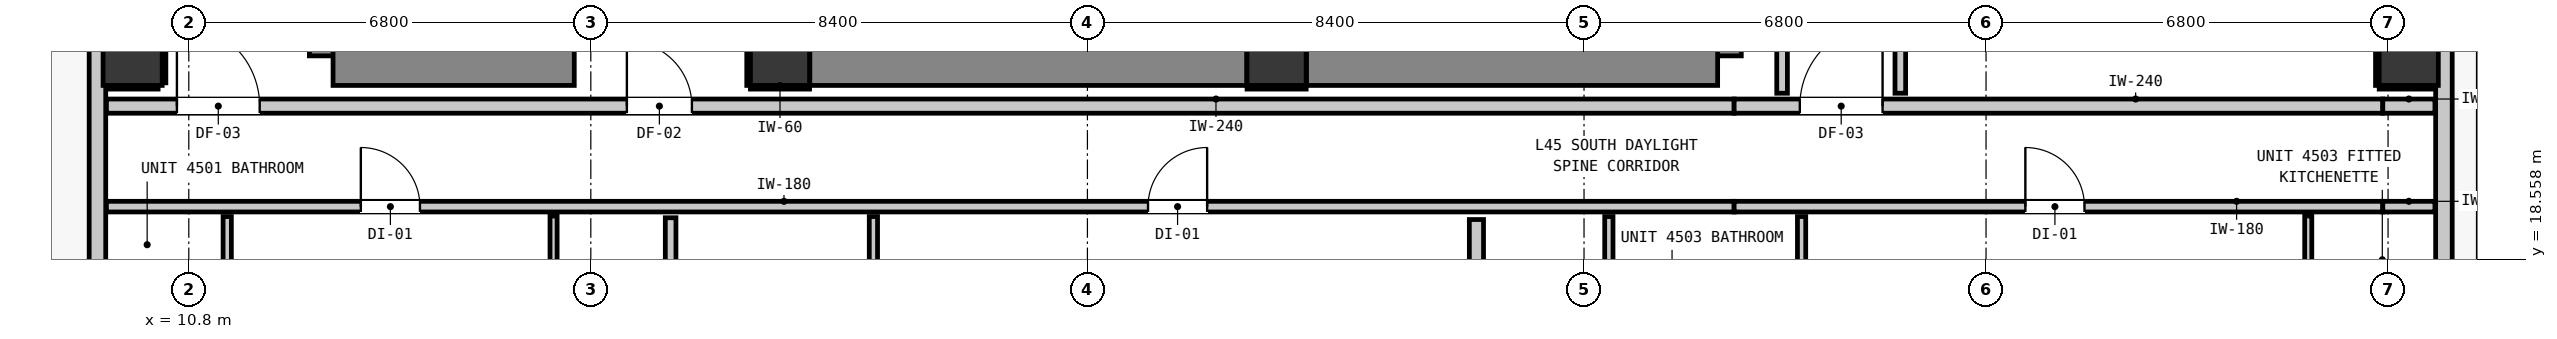
"""IFC4 building model, lengths in metres.
Left out: names, types, materials, properties, quantities, classifications, styles, units other than length and angle.
Written with IfcOpenShell. Run it as: python <this file> out.ifc"""

import sys

from ifc_helpers import new_model, si_unit, direction, frame, frame_2d, origin, origin_2d, place, context, subcontext, project, spatial, rectangle, extrude, element, fill, save


model = new_model("IFC4")
c1 = context("Model", 3, precision=1e-05, world=origin(), true_north=direction((0.0, 1.0)))
c2 = subcontext(c1, "Body", "Model", "MODEL_VIEW")
j1 = project(units=[si_unit("LENGTHUNIT", "METRE"), si_unit("PLANEANGLEUNIT", "RADIAN")], contexts=[c1])
p1 = place(None, origin())
s1 = spatial("IfcSite", under=j1, at=p1, CompositionType="ELEMENT")
p2 = place(p1, origin())
s2 = spatial("IfcBuilding", under=s1, at=p2, CompositionType="ELEMENT")
p3 = place(p2, frame((0.0, 0.0, 155.88)))
s3 = spatial("IfcBuildingStorey", under=s2, at=p3, CompositionType="ELEMENT", Elevation=155.88)
for number, where, z_axis, x_axis in (
    (1, (20.8, 22.0, 0.0), (0.0, 0.0, 1.0), (1.0, 0.0, 0.0)),
    (2, (29.2, 22.0, 0.0), (0.0, 0.0, 1.0), (1.0, 0.0, 0.0)),
):
    element("IfcColumn", number, at=place(p3, frame(where, z_axis=z_axis, x_axis=x_axis)), inside=s3, PredefinedType="COLUMN", context=c2, shape_type="SweptSolid", body=[
        extrude(rectangle(XDim=1.0, YDim=1.0, at=origin_2d()), origin(), (0.0, 0.0, 1.0), 3.32),
    ])
p4 = place(p3, frame((13.34, 22.0, 0.0), z_axis=(0.0, 0.0, 1.0), x_axis=(0.0, 1.0, 0.0)))
e3 = element("IfcWall", 3, at=p4, inside=s3, PredefinedType="SHEAR", context=c2, shape_type="SweptSolid", body=[
    extrude(rectangle(XDim=8.195, YDim=1.0, at=frame_2d((4.098, 0.0))), origin(), (0.0, 0.0, 1.0), 3.32),
])
p5 = place(p3, frame((13.24, 22.0, 0.0), z_axis=(0.0, 0.0, 1.0), x_axis=(1.0, 0.0, 0.0)))
e4 = element("IfcWall", 4, at=p5, inside=s3, PredefinedType="SHEAR", context=c2, shape_type="SweptSolid", body=[
    extrude(rectangle(XDim=4.08, YDim=1.0, at=frame_2d((2.04, 0.0))), origin(), (0.0, 0.0, 1.0), 3.32),
])
p6 = place(p3, frame((36.56, 22.0, 0.0), z_axis=(0.0, 0.0, 1.0), x_axis=(0.0, 1.0, 0.0)))
e5 = element("IfcWall", 5, at=p6, inside=s3, PredefinedType="SHEAR", context=c2, shape_type="SweptSolid", body=[
    extrude(rectangle(XDim=8.195, YDim=1.0, at=frame_2d((4.098, 0.0))), origin(), (0.0, 0.0, 1.0), 3.32),
])
p7 = place(p3, frame((29.705, 22.0, 0.0), z_axis=(0.0, 0.0, 1.0), x_axis=(1.0, 0.0, 0.0)))
e6 = element("IfcWall", 6, at=p7, inside=s3, PredefinedType="SHEAR", context=c2, shape_type="SweptSolid", body=[
    extrude(rectangle(XDim=6.955, YDim=1.0, at=frame_2d((3.478, 0.0))), origin(), (0.0, 0.0, 1.0), 3.32),
])
p8 = place(p3, frame((21.305, 22.0, 0.0), z_axis=(0.0, 0.0, 1.0), x_axis=(1.0, 0.0, 0.0)))
e7 = element("IfcWall", 7, at=p8, inside=s3, PredefinedType="SHEAR", context=c2, shape_type="SweptSolid", body=[
    extrude(rectangle(XDim=7.39, YDim=1.0, at=frame_2d((3.695, 0.0))), origin(), (0.0, 0.0, 1.0), 3.32),
])
for number, where, z_axis, x_axis in (
    (8, (9.85, 22.0, 0.0), (0.0, 0.0, 1.0), (1.0, 0.0, 0.0)),
    (9, (48.35, 22.0, 0.0), (0.0, 0.0, 1.0), (1.0, 0.0, 0.0)),
):
    element("IfcColumn", number, at=place(p3, frame(where, z_axis=z_axis, x_axis=x_axis)), inside=s3, PredefinedType="COLUMN", context=c2, shape_type="SweptSolid", body=[
        extrude(rectangle(XDim=1.0, YDim=1.0, at=origin_2d()), origin(), (0.0, 0.0, 1.0), 3.32),
    ])
p9 = place(p3, frame((9.255, 17.555, 0.0), z_axis=(0.0, 0.0, 1.0), x_axis=(0.0, 1.0, 0.0)))
e10 = element("IfcWall", 10, at=p9, inside=s3, PredefinedType="STANDARD", context=c2, shape_type="SweptSolid", body=[
    extrude(rectangle(XDim=32.29, YDim=0.28, at=frame_2d((16.145, 0.0))), origin(), (0.0, 0.0, 1.0), 3.08),
])
p10 = place(p9, frame((5.467, 0.0, 0.0)))
e11 = element("IfcOpeningElement", 11, at=p10, cuts=e10, PredefinedType="OPENING", context=c2, shape_type="SweptSolid", body=[
    extrude(rectangle(XDim=1.0, YDim=2.15, at=frame_2d((0.5, 1.075))), frame((0.0, 0.15, 0.0), z_axis=(0.0, -1.0, 0.0), x_axis=(1.0, 0.0, 0.0)), (0.0, 0.0, 1.0), 0.3),
])
p11 = place(p9, frame((30.727, 0.0, 0.85)))
e12 = element("IfcOpeningElement", 12, at=p11, cuts=e10, PredefinedType="OPENING", context=c2, shape_type="SweptSolid", body=[
    extrude(rectangle(XDim=1.1, YDim=2.05, at=frame_2d((0.55, 1.025))), frame((0.0, 0.15, 0.0), z_axis=(0.0, -1.0, 0.0), x_axis=(1.0, 0.0, 0.0)), (0.0, 0.0, 1.0), 0.3),
])
p12 = place(p3, frame((48.945, 49.845, 0.0), z_axis=(0.0, 0.0, 1.0), x_axis=(0.0, -1.0, 0.0)))
e13 = element("IfcWall", 13, at=p12, inside=s3, PredefinedType="STANDARD", context=c2, shape_type="SweptSolid", body=[
    extrude(rectangle(XDim=32.29, YDim=0.28, at=frame_2d((16.145, 0.0))), origin(), (0.0, 0.0, 1.0), 3.08),
])
p13 = place(p12, frame((0.904, 0.0, 0.0)))
e14 = element("IfcOpeningElement", 14, at=p13, cuts=e13, PredefinedType="OPENING", context=c2, shape_type="SweptSolid", body=[
    extrude(rectangle(XDim=1.0, YDim=2.15, at=frame_2d((0.5, 1.075))), frame((0.0, 0.15, 0.0), z_axis=(0.0, -1.0, 0.0), x_axis=(1.0, 0.0, 0.0)), (0.0, 0.0, 1.0), 0.3),
])
p14 = place(p12, frame((3.049, 0.0, 0.85)))
e15 = element("IfcOpeningElement", 15, at=p14, cuts=e13, PredefinedType="OPENING", context=c2, shape_type="SweptSolid", body=[
    extrude(rectangle(XDim=1.1, YDim=2.05, at=frame_2d((0.55, 1.025))), frame((0.0, 0.15, 0.0), z_axis=(0.0, -1.0, 0.0), x_axis=(1.0, 0.0, 0.0)), (0.0, 0.0, 1.0), 0.3),
])
p15 = place(p12, frame((21.311, 0.0, 0.85)))
e16 = element("IfcOpeningElement", 16, at=p15, cuts=e13, PredefinedType="OPENING", context=c2, shape_type="SweptSolid", body=[
    extrude(rectangle(XDim=1.1, YDim=2.05, at=frame_2d((0.55, 1.025))), frame((0.0, 0.15, 0.0), z_axis=(0.0, -1.0, 0.0), x_axis=(1.0, 0.0, 0.0)), (0.0, 0.0, 1.0), 0.3),
])
p16 = place(p12, frame((12.32, 0.0, 0.85)))
e17 = element("IfcOpeningElement", 17, at=p16, cuts=e13, PredefinedType="OPENING", context=c2, shape_type="SweptSolid", body=[
    extrude(rectangle(XDim=1.1, YDim=2.05, at=frame_2d((0.55, 1.025))), frame((0.0, 0.15, 0.0), z_axis=(0.0, -1.0, 0.0), x_axis=(1.0, 0.0, 0.0)), (0.0, 0.0, 1.0), 0.3),
])
p17 = place(p3, frame((9.407, 21.15, 0.0), z_axis=(0.0, 0.0, 1.0), x_axis=(1.0, 0.0, 0.0)))
e18 = element("IfcWall", 18, at=p17, inside=s3, PredefinedType="PARTITIONING", context=c2, shape_type="SweptSolid", body=[
    extrude(rectangle(XDim=27.532, YDim=0.24, at=frame_2d((13.766, 0.0))), origin(), (0.0, 0.0, 1.0), 3.08),
])
p18 = place(p17, frame((8.803, 0.0, 0.0)))
e19 = element("IfcOpeningElement", 19, at=p18, cuts=e18, PredefinedType="OPENING", context=c2, shape_type="SweptSolid", body=[
    extrude(rectangle(XDim=1.1, YDim=2.15, at=frame_2d((0.55, 1.075))), frame((0.0, 0.13, 0.0), z_axis=(0.0, -1.0, 0.0), x_axis=(1.0, 0.0, 0.0)), (0.0, 0.0, 1.0), 0.26),
])
p19 = place(p17, frame((1.192, 0.0, 0.0)))
e20 = element("IfcOpeningElement", 20, at=p19, cuts=e18, PredefinedType="OPENING", context=c2, shape_type="SweptSolid", body=[
    extrude(rectangle(XDim=1.4, YDim=2.15, at=frame_2d((0.7, 1.075))), frame((0.0, 0.13, 0.0), z_axis=(0.0, -1.0, 0.0), x_axis=(1.0, 0.0, 0.0)), (0.0, 0.0, 1.0), 0.26),
])
p20 = place(p3, frame((36.939, 21.15, 0.0), z_axis=(0.0, 0.0, 1.0), x_axis=(1.0, 0.0, 0.0)))
e21 = element("IfcWall", 21, at=p20, inside=s3, PredefinedType="PARTITIONING", context=c2, shape_type="SweptSolid", body=[
    extrude(rectangle(XDim=10.972, YDim=0.24, at=frame_2d((5.486, 0.0))), origin(), (0.0, 0.0, 1.0), 2.565),
])
p21 = place(p20, frame((1.111, 0.0, 0.0)))
e22 = element("IfcOpeningElement", 22, at=p21, cuts=e21, PredefinedType="OPENING", context=c2, shape_type="SweptSolid", body=[
    extrude(rectangle(XDim=1.4, YDim=2.15, at=frame_2d((0.7, 1.075))), frame((0.0, 0.13, 0.0), z_axis=(0.0, -1.0, 0.0), x_axis=(1.0, 0.0, 0.0)), (0.0, 0.0, 1.0), 0.26),
])
p22 = place(p3, frame((47.911, 21.15, 0.0), z_axis=(0.0, 0.0, 1.0), x_axis=(1.0, 0.0, 0.0)))
e23 = element("IfcWall", 23, at=p22, inside=s3, PredefinedType="PARTITIONING", context=c2, shape_type="SweptSolid", body=[
    extrude(rectangle(XDim=0.882, YDim=0.24, at=frame_2d((0.441, 0.0))), origin(), (0.0, 0.0, 1.0), 3.08),
])
p23 = place(p3, frame((9.407, 19.45, 0.0), z_axis=(0.0, 0.0, 1.0), x_axis=(1.0, 0.0, 0.0)))
e24 = element("IfcWall", 24, at=p23, inside=s3, PredefinedType="PARTITIONING", context=c2, shape_type="SweptSolid", body=[
    extrude(rectangle(XDim=27.532, YDim=0.18, at=frame_2d((13.766, 0.0))), origin(), (0.0, 0.0, 1.0), 3.08),
])
p24 = place(p23, frame((4.303, 0.0, 0.0)))
e25 = element("IfcOpeningElement", 25, at=p24, cuts=e24, PredefinedType="OPENING", context=c2, shape_type="SweptSolid", body=[
    extrude(rectangle(XDim=1.0, YDim=2.15, at=frame_2d((0.5, 1.075))), frame((0.0, 0.1, 0.0), z_axis=(0.0, -1.0, 0.0), x_axis=(1.0, 0.0, 0.0)), (0.0, 0.0, 1.0), 0.2),
])
p25 = place(p23, frame((17.618, 0.0, 0.0)))
e26 = element("IfcOpeningElement", 26, at=p25, cuts=e24, PredefinedType="OPENING", context=c2, shape_type="SweptSolid", body=[
    extrude(rectangle(XDim=1.0, YDim=2.15, at=frame_2d((0.5, 1.075))), frame((0.0, 0.1, 0.0), z_axis=(0.0, -1.0, 0.0), x_axis=(1.0, 0.0, 0.0)), (0.0, 0.0, 1.0), 0.2),
])
p26 = place(p3, frame((36.939, 19.45, 0.0), z_axis=(0.0, 0.0, 1.0), x_axis=(1.0, 0.0, 0.0)))
e27 = element("IfcWall", 27, at=p26, inside=s3, PredefinedType="PARTITIONING", context=c2, shape_type="SweptSolid", body=[
    extrude(rectangle(XDim=10.972, YDim=0.18, at=frame_2d((5.486, 0.0))), origin(), (0.0, 0.0, 1.0), 2.565),
])
p27 = place(p26, frame((4.926, 0.0, 0.0)))
e28 = element("IfcOpeningElement", 28, at=p27, cuts=e27, PredefinedType="OPENING", context=c2, shape_type="SweptSolid", body=[
    extrude(rectangle(XDim=1.0, YDim=2.15, at=frame_2d((0.5, 1.075))), frame((0.0, 0.1, 0.0), z_axis=(0.0, -1.0, 0.0), x_axis=(1.0, 0.0, 0.0)), (0.0, 0.0, 1.0), 0.2),
])
p28 = place(p3, frame((47.911, 19.45, 0.0), z_axis=(0.0, 0.0, 1.0), x_axis=(1.0, 0.0, 0.0)))
e29 = element("IfcWall", 29, at=p28, inside=s3, PredefinedType="PARTITIONING", context=c2, shape_type="SweptSolid", body=[
    extrude(rectangle(XDim=0.882, YDim=0.18, at=frame_2d((0.441, 0.0))), origin(), (0.0, 0.0, 1.0), 3.08),
])
p29 = place(p3, frame((32.58, 15.407, 0.0), z_axis=(0.0, 0.0, 1.0), x_axis=(0.0, 1.0, 0.0)))
e30 = element("IfcWall", 30, at=p29, inside=s3, PredefinedType="PARTITIONING", context=c2, shape_type="SweptSolid", body=[
    extrude(rectangle(XDim=3.825, YDim=0.24, at=frame_2d((1.913, 0.0))), origin(), (0.0, 0.0, 1.0), 3.08),
])
p30 = place(p29, frame((1.568, 0.0, 0.0)))
e31 = element("IfcOpeningElement", 31, at=p30, cuts=e30, PredefinedType="OPENING", context=c2, shape_type="SweptSolid", body=[
    extrude(rectangle(XDim=0.9, YDim=2.1, at=frame_2d((0.45, 1.05))), frame((0.0, 0.13, 0.0), z_axis=(0.0, -1.0, 0.0), x_axis=(1.0, 0.0, 0.0)), (0.0, 0.0, 1.0), 0.26),
])
p31 = place(p3, frame((18.95, 15.407, 0.0), z_axis=(0.0, 0.0, 1.0), x_axis=(0.0, 1.0, 0.0)))
e32 = element("IfcWall", 32, at=p31, inside=s3, PredefinedType="PARTITIONING", context=c2, shape_type="SweptSolid", body=[
    extrude(rectangle(XDim=3.855, YDim=0.18, at=frame_2d((1.927, 0.0))), origin(), (0.0, 0.0, 1.0), 3.08),
])
p32 = place(p3, frame((37.75, 21.368, 0.0), z_axis=(0.0, 0.0, 1.0), x_axis=(0.0, 1.0, 0.0)))
e33 = element("IfcWall", 33, at=p32, inside=s3, PredefinedType="PARTITIONING", context=c2, shape_type="SweptSolid", body=[
    extrude(rectangle(XDim=18.694, YDim=0.18, at=frame_2d((9.347, 0.0))), origin(), (0.0, 0.0, 1.0), 3.08),
])
p33 = place(p3, frame((39.75, 21.368, 0.0), z_axis=(0.0, 0.0, 1.0), x_axis=(0.0, 1.0, 0.0)))
e34 = element("IfcWall", 34, at=p33, inside=s3, PredefinedType="PARTITIONING", context=c2, shape_type="SweptSolid", body=[
    extrude(rectangle(XDim=3.964, YDim=0.18, at=frame_2d((1.982, 0.0))), origin(), (0.0, 0.0, 1.0), 3.08),
])
p34 = place(p3, frame((11.45, 16.278, 0.0), z_axis=(0.0, 0.0, 1.0), x_axis=(0.0, 1.0, 0.0)))
e35 = element("IfcWall", 35, at=p34, inside=s3, PredefinedType="PARTITIONING", context=c2, shape_type="SweptSolid", body=[
    extrude(rectangle(XDim=3.004, YDim=0.14, at=frame_2d((1.502, 0.0))), origin(), (0.0, 0.0, 1.0), 2.565),
])
p35 = place(p34, frame((0.717, 0.0, 0.0)))
e36 = element("IfcOpeningElement", 36, at=p35, cuts=e35, PredefinedType="OPENING", context=c2, shape_type="SweptSolid", body=[
    extrude(rectangle(XDim=0.86, YDim=2.02, at=frame_2d((0.43, 1.01))), frame((0.0, 0.08, 0.0), z_axis=(0.0, -1.0, 0.0), x_axis=(1.0, 0.0, 0.0)), (0.0, 0.0, 1.0), 0.16),
])
p36 = place(p3, frame((22.38, 15.407, 0.0), z_axis=(0.0, 0.0, 1.0), x_axis=(0.0, 1.0, 0.0)))
e37 = element("IfcWall", 37, at=p36, inside=s3, PredefinedType="PARTITIONING", context=c2, shape_type="SweptSolid", body=[
    extrude(rectangle(XDim=3.875, YDim=0.14, at=frame_2d((1.938, 0.0))), origin(), (0.0, 0.0, 1.0), 3.08),
])
p37 = place(p36, frame((1.588, 0.0, 0.0)))
e38 = element("IfcOpeningElement", 38, at=p37, cuts=e37, PredefinedType="OPENING", context=c2, shape_type="SweptSolid", body=[
    extrude(rectangle(XDim=0.86, YDim=2.02, at=frame_2d((0.43, 1.01))), frame((0.0, 0.08, 0.0), z_axis=(0.0, -1.0, 0.0), x_axis=(1.0, 0.0, 0.0)), (0.0, 0.0, 1.0), 0.16),
])
p38 = place(p3, frame((34.82, 15.407, 0.0), z_axis=(0.0, 0.0, 1.0), x_axis=(0.0, 1.0, 0.0)))
e39 = element("IfcWall", 39, at=p38, inside=s3, PredefinedType="PARTITIONING", context=c2, shape_type="SweptSolid", body=[
    extrude(rectangle(XDim=3.875, YDim=0.14, at=frame_2d((1.938, 0.0))), origin(), (0.0, 0.0, 1.0), 3.08),
])
p39 = place(p3, frame((38.08, 15.407, 0.0), z_axis=(0.0, 0.0, 1.0), x_axis=(0.0, 1.0, 0.0)))
e40 = element("IfcWall", 40, at=p39, inside=s3, PredefinedType="PARTITIONING", context=c2, shape_type="SweptSolid", body=[
    extrude(rectangle(XDim=3.875, YDim=0.14, at=frame_2d((1.938, 0.0))), origin(), (0.0, 0.0, 1.0), 3.08),
])
p40 = place(p39, frame((1.588, 0.0, 0.0)))
e41 = element("IfcOpeningElement", 41, at=p40, cuts=e40, PredefinedType="OPENING", context=c2, shape_type="SweptSolid", body=[
    extrude(rectangle(XDim=0.86, YDim=2.02, at=frame_2d((0.43, 1.01))), frame((0.0, 0.08, 0.0), z_axis=(0.0, -1.0, 0.0), x_axis=(1.0, 0.0, 0.0)), (0.0, 0.0, 1.0), 0.16),
])
p41 = place(p3, frame((16.97, 15.407, 0.0), z_axis=(0.0, 0.0, 1.0), x_axis=(0.0, 1.0, 0.0)))
e42 = element("IfcWall", 42, at=p41, inside=s3, PredefinedType="PARTITIONING", context=c2, shape_type="SweptSolid", body=[
    extrude(rectangle(XDim=3.885, YDim=0.12, at=frame_2d((1.942, 0.0))), origin(), (0.0, 0.0, 1.0), 3.08),
])
p42 = place(p41, frame((1.568, 0.0, 0.0)))
e43 = element("IfcOpeningElement", 43, at=p42, cuts=e42, PredefinedType="OPENING", context=c2, shape_type="SweptSolid", body=[
    extrude(rectangle(XDim=0.9, YDim=2.1, at=frame_2d((0.45, 1.05))), frame((0.0, 0.07, 0.0), z_axis=(0.0, -1.0, 0.0), x_axis=(1.0, 0.0, 0.0)), (0.0, 0.0, 1.0), 0.14),
])
p43 = place(p3, frame((46.65, 15.475, 0.0), z_axis=(0.0, 0.0, 1.0), x_axis=(0.0, 1.0, 0.0)))
e44 = element("IfcWall", 44, at=p43, inside=s3, PredefinedType="PARTITIONING", context=c2, shape_type="SweptSolid", body=[
    extrude(rectangle(XDim=3.817, YDim=0.12, at=frame_2d((1.908, 0.0))), origin(), (0.0, 0.0, 1.0), 3.08),
])
p44 = place(p43, frame((1.5, 0.0, 0.0)))
e45 = element("IfcOpeningElement", 45, at=p44, cuts=e44, PredefinedType="OPENING", context=c2, shape_type="SweptSolid", body=[
    extrude(rectangle(XDim=0.9, YDim=2.1, at=frame_2d((0.45, 1.05))), frame((0.0, 0.07, 0.0), z_axis=(0.0, -1.0, 0.0), x_axis=(1.0, 0.0, 0.0)), (0.0, 0.0, 1.0), 0.14),
])
for number, where, z_axis, x_axis in (
    (46, (20.3, 21.468, 0.0), (0.0, 0.0, 1.0), (1.0, 0.0, 0.0)),
    (47, (20.268, 21.5, 0.0), (0.0, 0.0, 1.0), (0.0, 1.0, 0.0)),
    (48, (28.7, 21.468, 0.0), (0.0, 0.0, 1.0), (1.0, 0.0, 0.0)),
):
    element("IfcWall", number, at=place(p3, frame(where, z_axis=z_axis, x_axis=x_axis)), inside=s3, PredefinedType="PARTITIONING", context=c2, shape_type="SweptSolid", body=[
        extrude(rectangle(XDim=1.0, YDim=0.06, at=frame_2d((0.5, 0.0))), origin(), (0.0, 0.0, 1.0), 1.45),
    ])
p45 = place(p3, frame((9.41, 21.468, 0.0), z_axis=(0.0, 0.0, 1.0), x_axis=(1.0, 0.0, 0.0)))
e49 = element("IfcWall", 49, at=p45, inside=s3, PredefinedType="PARTITIONING", context=c2, shape_type="SweptSolid", body=[
    extrude(rectangle(XDim=0.871, YDim=0.06, at=frame_2d((0.436, 0.0))), origin(), (0.0, 0.0, 1.0), 1.45),
])
p46 = place(p3, frame((10.382, 21.544, 0.0), z_axis=(0.0, 0.0, 1.0), x_axis=(0.0, 1.0, 0.0)))
e50 = element("IfcWall", 50, at=p46, inside=s3, PredefinedType="PARTITIONING", context=c2, shape_type="SweptSolid", body=[
    extrude(rectangle(XDim=0.956, YDim=0.06, at=frame_2d((0.478, 0.0))), origin(), (0.0, 0.0, 1.0), 1.45),
])
p47 = place(p3, frame((47.85, 21.468, 0.0), z_axis=(0.0, 0.0, 1.0), x_axis=(1.0, 0.0, 0.0)))
e51 = element("IfcWall", 51, at=p47, inside=s3, PredefinedType="PARTITIONING", context=c2, shape_type="SweptSolid", body=[
    extrude(rectangle(XDim=0.94, YDim=0.06, at=frame_2d((0.47, 0.0))), origin(), (0.0, 0.0, 1.0), 1.45),
])
p48 = place(p3, frame((47.818, 21.5, 0.0), z_axis=(0.0, 0.0, 1.0), x_axis=(0.0, 1.0, 0.0)))
e52 = element("IfcWall", 52, at=p48, inside=s3, PredefinedType="PARTITIONING", context=c2, shape_type="SweptSolid", body=[
    extrude(rectangle(XDim=1.0, YDim=0.06, at=frame_2d((0.5, 0.0))), origin(), (0.0, 0.0, 1.0), 1.45),
])
p49 = place(p18, origin())
e53 = element("IfcDoor", 53, at=p49, inside=s3, OperationType="SINGLE_SWING_LEFT", PredefinedType="DOOR", context=c2, shape_type="SweptSolid", body=[
    extrude(rectangle(XDim=1.1, YDim=2.15, at=frame_2d((0.55, 1.075))), frame((0.0, 0.025, 0.0), z_axis=(0.0, -1.0, 0.0), x_axis=(1.0, 0.0, 0.0)), (0.0, 0.0, 1.0), 0.05),
])
fill(e19, e53)
p50 = place(p19, origin())
e54 = element("IfcDoor", 54, at=p50, inside=s3, OperationType="SINGLE_SWING_LEFT", PredefinedType="DOOR", context=c2, shape_type="SweptSolid", body=[
    extrude(rectangle(XDim=1.4, YDim=2.15, at=frame_2d((0.7, 1.075))), frame((0.0, 0.025, 0.0), z_axis=(0.0, -1.0, 0.0), x_axis=(1.0, 0.0, 0.0)), (0.0, 0.0, 1.0), 0.05),
])
fill(e20, e54)
p51 = place(p21, origin())
e55 = element("IfcDoor", 55, at=p51, inside=s3, OperationType="SINGLE_SWING_RIGHT", PredefinedType="DOOR", context=c2, shape_type="SweptSolid", body=[
    extrude(rectangle(XDim=1.4, YDim=2.15, at=frame_2d((0.7, 1.075))), frame((0.0, 0.025, 0.0), z_axis=(0.0, -1.0, 0.0), x_axis=(1.0, 0.0, 0.0)), (0.0, 0.0, 1.0), 0.05),
])
fill(e22, e55)
p52 = place(p24, origin())
e56 = element("IfcDoor", 56, at=p52, inside=s3, OperationType="SINGLE_SWING_LEFT", PredefinedType="DOOR", context=c2, shape_type="SweptSolid", body=[
    extrude(rectangle(XDim=1.0, YDim=2.15, at=frame_2d((0.5, 1.075))), frame((0.0, 0.025, 0.0), z_axis=(0.0, -1.0, 0.0), x_axis=(1.0, 0.0, 0.0)), (0.0, 0.0, 1.0), 0.05),
])
fill(e25, e56)
p53 = place(p25, origin())
e57 = element("IfcDoor", 57, at=p53, inside=s3, OperationType="SINGLE_SWING_RIGHT", PredefinedType="DOOR", context=c2, shape_type="SweptSolid", body=[
    extrude(rectangle(XDim=1.0, YDim=2.15, at=frame_2d((0.5, 1.075))), frame((0.0, 0.025, 0.0), z_axis=(0.0, -1.0, 0.0), x_axis=(1.0, 0.0, 0.0)), (0.0, 0.0, 1.0), 0.05),
])
fill(e26, e57)
p54 = place(p27, origin())
e58 = element("IfcDoor", 58, at=p54, inside=s3, OperationType="SINGLE_SWING_LEFT", PredefinedType="DOOR", context=c2, shape_type="SweptSolid", body=[
    extrude(rectangle(XDim=1.0, YDim=2.15, at=frame_2d((0.5, 1.075))), frame((0.0, 0.025, 0.0), z_axis=(0.0, -1.0, 0.0), x_axis=(1.0, 0.0, 0.0)), (0.0, 0.0, 1.0), 0.05),
])
fill(e28, e58)
save(model, sys.argv[1])
